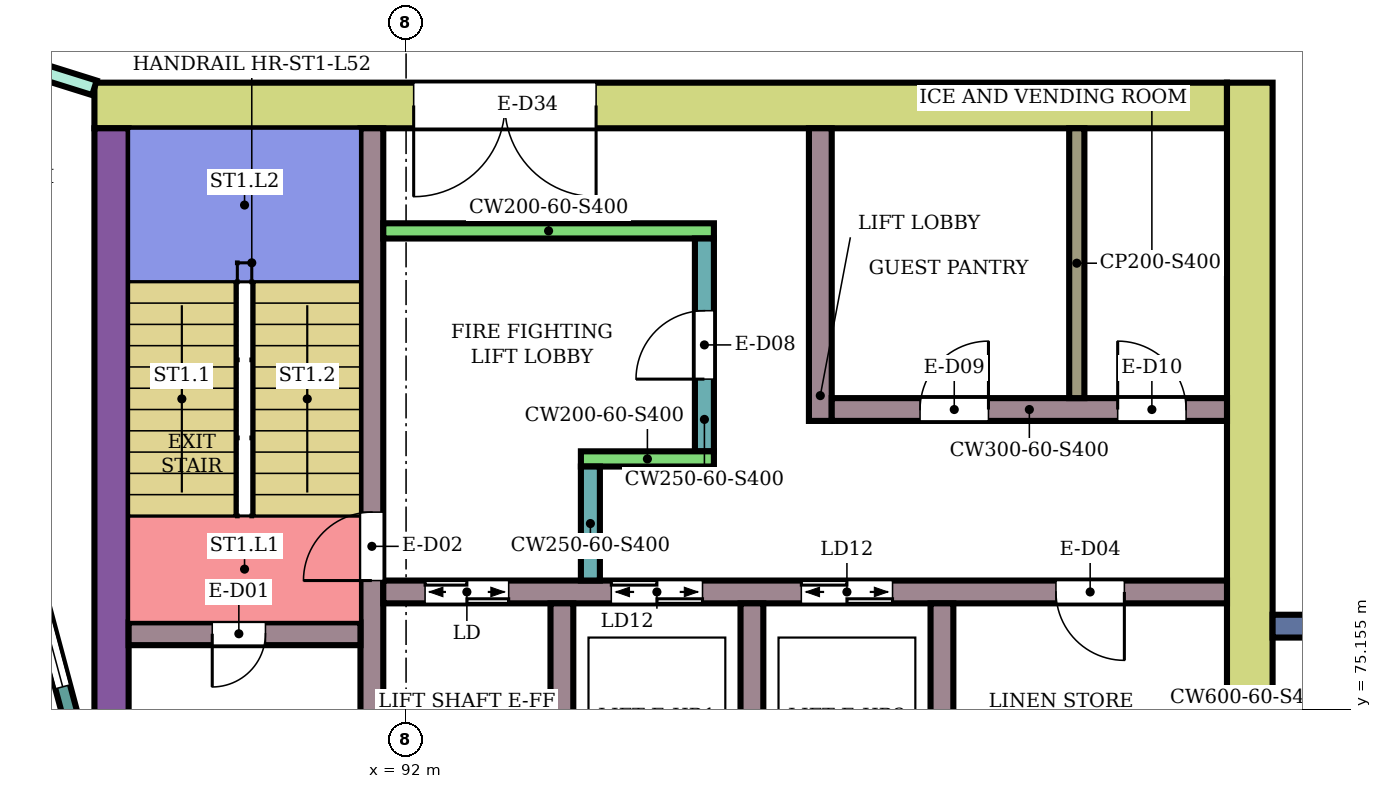
"""IFC4 building model, lengths in metres.
Left out: names, types, materials, properties, quantities, classifications, styles, units other than length and angle.
Written with IfcOpenShell. Run it as: python <this file> out.ifc"""

import sys

from ifc_helpers import new_model, si_unit, direction, frame, frame_2d, origin, place, context, subcontext, project, spatial, rectangle, extrude, element, fill, save


model = new_model("IFC4")
c1 = context("Model", 3, precision=1e-05, world=origin(), true_north=direction((0.0, 1.0)))
c2 = subcontext(c1, "Body", "Model", "MODEL_VIEW")
j1 = project(units=[si_unit("LENGTHUNIT", "METRE"), si_unit("PLANEANGLEUNIT", "RADIAN")], contexts=[c1])
p1 = place(None, origin())
s1 = spatial("IfcSite", under=j1, at=p1, CompositionType="ELEMENT")
p2 = place(p1, origin())
s2 = spatial("IfcBuilding", under=s1, at=p2, CompositionType="ELEMENT")
p3 = place(p2, frame((0.0, 0.0, 225.1)))
s3 = spatial("IfcBuildingStorey", under=s2, at=p3, CompositionType="ELEMENT", Elevation=225.1)
p4 = place(p3, frame((87.9, 83.1, 0.0), z_axis=(0.0, 0.0, 1.0), x_axis=(1.0, 0.0, 0.0)))
e1 = element("IfcWall", 1, at=p4, inside=s3, PredefinedType="SHEAR", context=c2, shape_type="SweptSolid", body=[
    extrude(rectangle(XDim=14.9, YDim=0.6, at=frame_2d((7.45, 0.0))), origin(), (0.0, 0.0, 1.0), 3.8),
])
p5 = place(p4, frame((4.2, 0.0, 0.0)))
e2 = element("IfcOpeningElement", 2, at=p5, cuts=e1, PredefinedType="OPENING", context=c2, shape_type="SweptSolid", body=[
    extrude(rectangle(XDim=2.4, YDim=2.4, at=frame_2d((1.2, 1.2))), frame((0.0, 0.31, 0.0), z_axis=(0.0, -1.0, 0.0), x_axis=(1.0, 0.0, 0.0)), (0.0, 0.0, 1.0), 0.62),
])
p6 = place(p3, frame((88.125, 75.0, 0.0), z_axis=(0.0, 0.0, 1.0), x_axis=(0.0, 1.0, 0.0)))
e3 = element("IfcWall", 3, at=p6, inside=s3, PredefinedType="SHEAR", context=c2, shape_type="SweptSolid", body=[
    extrude(rectangle(XDim=7.8, YDim=0.45, at=frame_2d((3.9, 0.0))), origin(), (0.0, 0.0, 1.0), 3.8),
])
p7 = place(p3, frame((103.1, 66.6, 0.0), z_axis=(0.0, 0.0, 1.0), x_axis=(0.0, 1.0, 0.0)))
e4 = element("IfcWall", 4, at=p7, inside=s3, PredefinedType="SHEAR", context=c2, shape_type="SweptSolid", body=[
    extrude(rectangle(XDim=16.8, YDim=0.6, at=frame_2d((8.4, 0.0))), origin(), (0.0, 0.0, 1.0), 3.8),
])
p8 = place(p3, frame((91.55, 75.0, 0.0), z_axis=(0.0, 0.0, 1.0), x_axis=(0.0, 1.0, 0.0)))
e5 = element("IfcWall", 5, at=p8, inside=s3, PredefinedType="SHEAR", context=c2, shape_type="SweptSolid", body=[
    extrude(rectangle(XDim=7.8, YDim=0.3, at=frame_2d((3.9, 0.0))), origin(), (0.0, 0.0, 1.0), 3.8),
])
p9 = place(p8, frame((1.85, 0.0, 0.0)))
e6 = element("IfcOpeningElement", 6, at=p9, cuts=e5, PredefinedType="OPENING", context=c2, shape_type="SweptSolid", body=[
    extrude(rectangle(XDim=0.9, YDim=2.1, at=frame_2d((0.45, 1.05))), frame((0.0, 0.16, 0.0), z_axis=(0.0, -1.0, 0.0), x_axis=(1.0, 0.0, 0.0)), (0.0, 0.0, 1.0), 0.32),
])
p10 = place(p3, frame((88.35, 76.15, 0.0), z_axis=(0.0, 0.0, 1.0), x_axis=(1.0, 0.0, 0.0)))
e7 = element("IfcWall", 7, at=p10, inside=s3, PredefinedType="SHEAR", context=c2, shape_type="SweptSolid", body=[
    extrude(rectangle(XDim=3.05, YDim=0.3, at=frame_2d((1.525, 0.0))), origin(), (0.0, 0.0, 1.0), 3.8),
])
p11 = place(p10, frame((1.1, 0.0, 0.0)))
e8 = element("IfcOpeningElement", 8, at=p11, cuts=e7, PredefinedType="OPENING", context=c2, shape_type="SweptSolid", body=[
    extrude(rectangle(XDim=0.7, YDim=2.0, at=frame_2d((0.35, 1.0))), frame((0.0, 0.16, 0.0), z_axis=(0.0, -1.0, 0.0), x_axis=(1.0, 0.0, 0.0)), (0.0, 0.0, 1.0), 0.32),
])
p12 = place(p3, frame((91.7, 76.7, 0.0), z_axis=(0.0, 0.0, 1.0), x_axis=(1.0, 0.0, 0.0)))
e9 = element("IfcWall", 9, at=p12, inside=s3, PredefinedType="SHEAR", context=c2, shape_type="SweptSolid", body=[
    extrude(rectangle(XDim=11.1, YDim=0.3, at=frame_2d((5.55, 0.0))), origin(), (0.0, 0.0, 1.0), 3.8),
])
p13 = place(p12, frame((0.55, 0.0, 0.0)))
e10 = element("IfcOpeningElement", 10, at=p13, cuts=e9, PredefinedType="OPENING", context=c2, shape_type="SweptSolid", body=[
    extrude(rectangle(XDim=1.1, YDim=2.1, at=frame_2d((0.55, 1.05))), frame((0.0, 0.16, 0.0), z_axis=(0.0, -1.0, 0.0), x_axis=(1.0, 0.0, 0.0)), (0.0, 0.0, 1.0), 0.32),
])
p14 = place(p12, frame((3.0, 0.0, 0.0)))
e11 = element("IfcOpeningElement", 11, at=p14, cuts=e9, PredefinedType="OPENING", context=c2, shape_type="SweptSolid", body=[
    extrude(rectangle(XDim=1.2, YDim=2.1, at=frame_2d((0.6, 1.05))), frame((0.0, 0.16, 0.0), z_axis=(0.0, -1.0, 0.0), x_axis=(1.0, 0.0, 0.0)), (0.0, 0.0, 1.0), 0.32),
])
p15 = place(p12, frame((5.5, 0.0, 0.0)))
e12 = element("IfcOpeningElement", 12, at=p15, cuts=e9, PredefinedType="OPENING", context=c2, shape_type="SweptSolid", body=[
    extrude(rectangle(XDim=1.2, YDim=2.1, at=frame_2d((0.6, 1.05))), frame((0.0, 0.16, 0.0), z_axis=(0.0, -1.0, 0.0), x_axis=(1.0, 0.0, 0.0)), (0.0, 0.0, 1.0), 0.32),
])
p16 = place(p12, frame((8.85, 0.0, 0.0)))
e13 = element("IfcOpeningElement", 13, at=p16, cuts=e9, PredefinedType="OPENING", context=c2, shape_type="SweptSolid", body=[
    extrude(rectangle(XDim=0.9, YDim=2.1, at=frame_2d((0.45, 1.05))), frame((0.0, 0.16, 0.0), z_axis=(0.0, -1.0, 0.0), x_axis=(1.0, 0.0, 0.0)), (0.0, 0.0, 1.0), 0.32),
])
for number, where, z_axis, x_axis in (
    (14, (94.05, 74.0, 0.0), (0.0, 0.0, 1.0), (0.0, 1.0, 0.0)),
    (15, (96.55, 74.0, 0.0), (0.0, 0.0, 1.0), (0.0, 1.0, 0.0)),
    (16, (99.05, 74.0, 0.0), (0.0, 0.0, 1.0), (0.0, 1.0, 0.0)),
):
    element("IfcWall", number, at=place(p3, frame(where, z_axis=z_axis, x_axis=x_axis)), inside=s3, PredefinedType="SHEAR", context=c2, shape_type="SweptSolid", body=[
        extrude(rectangle(XDim=2.55, YDim=0.3, at=frame_2d((1.275, 0.0))), origin(), (0.0, 0.0, 1.0), 3.8),
    ])
p17 = place(p3, frame((91.7, 81.45, 0.0), z_axis=(0.0, 0.0, 1.0), x_axis=(1.0, 0.0, 0.0)))
e17 = element("IfcWall", 17, at=p17, inside=s3, PredefinedType="SHEAR", context=c2, shape_type="SweptSolid", body=[
    extrude(rectangle(XDim=4.35, YDim=0.2, at=frame_2d((2.175, 0.0))), origin(), (0.0, 0.0, 1.0), 3.8),
])
p18 = place(p3, frame((95.925, 78.55, 0.0), z_axis=(0.0, 0.0, 1.0), x_axis=(0.0, 1.0, 0.0)))
e18 = element("IfcWall", 18, at=p18, inside=s3, PredefinedType="SHEAR", context=c2, shape_type="SweptSolid", body=[
    extrude(rectangle(XDim=2.8, YDim=0.25, at=frame_2d((1.4, 0.0))), origin(), (0.0, 0.0, 1.0), 3.8),
])
p19 = place(p18, frame((0.95, 0.0, 0.0)))
e19 = element("IfcOpeningElement", 19, at=p19, cuts=e18, PredefinedType="OPENING", context=c2, shape_type="SweptSolid", body=[
    extrude(rectangle(XDim=0.9, YDim=2.1, at=frame_2d((0.45, 1.05))), frame((0.0, 0.135, 0.0), z_axis=(0.0, -1.0, 0.0), x_axis=(1.0, 0.0, 0.0)), (0.0, 0.0, 1.0), 0.27),
])
p20 = place(p3, frame((94.3, 78.45, 0.0), z_axis=(0.0, 0.0, 1.0), x_axis=(1.0, 0.0, 0.0)))
e20 = element("IfcWall", 20, at=p20, inside=s3, PredefinedType="SHEAR", context=c2, shape_type="SweptSolid", body=[
    extrude(rectangle(XDim=1.75, YDim=0.2, at=frame_2d((0.875, 0.0))), origin(), (0.0, 0.0, 1.0), 3.8),
])
p21 = place(p3, frame((94.425, 76.85, 0.0), z_axis=(0.0, 0.0, 1.0), x_axis=(0.0, 1.0, 0.0)))
e21 = element("IfcWall", 21, at=p21, inside=s3, PredefinedType="SHEAR", context=c2, shape_type="SweptSolid", body=[
    extrude(rectangle(XDim=1.5, YDim=0.25, at=frame_2d((0.75, 0.0))), origin(), (0.0, 0.0, 1.0), 3.8),
])
p22 = place(p3, frame((97.45, 78.95, 0.0), z_axis=(0.0, 0.0, 1.0), x_axis=(0.0, 1.0, 0.0)))
e22 = element("IfcWall", 22, at=p22, inside=s3, PredefinedType="SHEAR", context=c2, shape_type="SweptSolid", body=[
    extrude(rectangle(XDim=3.85, YDim=0.3, at=frame_2d((1.925, 0.0))), origin(), (0.0, 0.0, 1.0), 3.8),
])
p23 = place(p3, frame((97.6, 79.1, 0.0), z_axis=(0.0, 0.0, 1.0), x_axis=(1.0, 0.0, 0.0)))
e23 = element("IfcWall", 23, at=p23, inside=s3, PredefinedType="SHEAR", context=c2, shape_type="SweptSolid", body=[
    extrude(rectangle(XDim=5.2, YDim=0.3, at=frame_2d((2.6, 0.0))), origin(), (0.0, 0.0, 1.0), 3.8),
])
p24 = place(p23, frame((1.162, 0.0, 0.0)))
e24 = element("IfcOpeningElement", 24, at=p24, cuts=e23, PredefinedType="OPENING", context=c2, shape_type="SweptSolid", body=[
    extrude(rectangle(XDim=0.9, YDim=2.1, at=frame_2d((0.45, 1.05))), frame((0.0, 0.16, 0.0), z_axis=(0.0, -1.0, 0.0), x_axis=(1.0, 0.0, 0.0)), (0.0, 0.0, 1.0), 0.32),
])
p25 = place(p23, frame((3.762, 0.0, 0.0)))
e25 = element("IfcOpeningElement", 25, at=p25, cuts=e23, PredefinedType="OPENING", context=c2, shape_type="SweptSolid", body=[
    extrude(rectangle(XDim=0.9, YDim=2.1, at=frame_2d((0.45, 1.05))), frame((0.0, 0.16, 0.0), z_axis=(0.0, -1.0, 0.0), x_axis=(1.0, 0.0, 0.0)), (0.0, 0.0, 1.0), 0.32),
])
p26 = place(p3, frame((103.4, 76.25, 0.0), z_axis=(0.0, 0.0, 1.0), x_axis=(1.0, 0.0, 0.0)))
e26 = element("IfcWall", 26, at=p26, inside=s3, PredefinedType="NOTDEFINED", context=c2, shape_type="SweptSolid", body=[
    extrude(rectangle(XDim=2.416, YDim=0.3, at=frame_2d((1.208, 0.0))), origin(), (0.0, 0.0, 1.0), 4.2),
])
p27 = place(p3, frame((87.604, 75.0, 0.0), z_axis=(0.0, 0.0, 1.0), x_axis=(-0.258789828301, 0.965933654434, 0.0)))
e27 = element("IfcWall", 27, at=p27, inside=s3, PredefinedType="NOTDEFINED", context=c2, shape_type="SweptSolid", body=[
    extrude(rectangle(XDim=3.936, YDim=0.2, at=frame_2d((1.968, 0.0))), origin(), (0.0, 0.0, 1.0), 4.2),
])
p28 = place(p27, frame((0.468, 0.0, 0.9)))
e28 = element("IfcOpeningElement", 28, at=p28, cuts=e27, PredefinedType="OPENING", context=c2, shape_type="SweptSolid", body=[
    extrude(rectangle(XDim=3.0, YDim=2.3, at=frame_2d((1.5, 1.15))), frame((0.0, 0.11, 0.0), z_axis=(0.0, -1.0, 0.0), x_axis=(1.0, 0.0, 0.0)), (0.0, 0.0, 1.0), 0.22),
])
p29 = place(p3, frame((85.587, 84.057, 0.0), z_axis=(0.0, 0.0, 1.0), x_axis=(0.954239513179, -0.299043393987, 0.0)))
e29 = element("IfcWall", 29, at=p29, inside=s3, PredefinedType="PARTITIONING", context=c2, shape_type="SweptSolid", body=[
    extrude(rectangle(XDim=2.424, YDim=0.2, at=frame_2d((1.212, 0.0))), origin(), (0.0, 0.0, 1.0), 3.75),
])
p30 = place(p29, frame((0.762, 0.0, 0.0)))
e30 = element("IfcOpeningElement", 30, at=p30, cuts=e29, PredefinedType="OPENING", context=c2, shape_type="SweptSolid", body=[
    extrude(rectangle(XDim=0.9, YDim=2.1, at=frame_2d((0.45, 1.05))), frame((0.0, 0.11, 0.0), z_axis=(0.0, -1.0, 0.0), x_axis=(1.0, 0.0, 0.0)), (0.0, 0.0, 1.0), 0.22),
])
p31 = place(p3, frame((100.824, 79.25, 0.0), z_axis=(0.0, 0.0, 1.0), x_axis=(0.0, 1.0, 0.0)))
e31 = element("IfcWall", 31, at=p31, inside=s3, PredefinedType="PARTITIONING", context=c2, shape_type="SweptSolid", body=[
    extrude(rectangle(XDim=3.55, YDim=0.2, at=frame_2d((1.775, 0.0))), origin(), (0.0, 0.0, 1.0), 3.8),
])
p32 = place(p28, origin())
e32 = element("IfcWindow", 32, at=p32, inside=s3, PartitioningType="SINGLE_PANEL", PredefinedType="WINDOW", context=c2, shape_type="SweptSolid", body=[
    extrude(rectangle(XDim=3.0, YDim=2.3, at=frame_2d((1.5, 1.15))), frame((0.0, 0.03, 0.0), z_axis=(0.0, -1.0, 0.0), x_axis=(1.0, 0.0, 0.0)), (0.0, 0.0, 1.0), 0.06),
])
fill(e28, e32)
p33 = place(p11, frame((0.7, 0.0, 0.0), z_axis=(0.0, 0.0, 1.0), x_axis=(-1.0, 0.0, 0.0)))
e33 = element("IfcDoor", 33, at=p33, inside=s3, OperationType="SINGLE_SWING_RIGHT", PredefinedType="DOOR", context=c2, shape_type="SweptSolid", body=[
    extrude(rectangle(XDim=0.7, YDim=2.0, at=frame_2d((0.35, 1.0))), frame((0.0, 0.025, 0.0), z_axis=(0.0, -1.0, 0.0), x_axis=(1.0, 0.0, 0.0)), (0.0, 0.0, 1.0), 0.05),
])
fill(e8, e33)
p34 = place(p9, origin())
e34 = element("IfcDoor", 34, at=p34, inside=s3, OperationType="SINGLE_SWING_LEFT", PredefinedType="DOOR", context=c2, shape_type="SweptSolid", body=[
    extrude(rectangle(XDim=0.9, YDim=2.1, at=frame_2d((0.45, 1.05))), frame((0.0, 0.025, 0.0), z_axis=(0.0, -1.0, 0.0), x_axis=(1.0, 0.0, 0.0)), (0.0, 0.0, 1.0), 0.05),
])
fill(e6, e34)
p35 = place(p13, origin())
e35 = element("IfcDoor", 35, at=p35, inside=s3, OperationType="DOUBLE_DOOR_SLIDING", PredefinedType="DOOR", context=c2, shape_type="SweptSolid", body=[
    extrude(rectangle(XDim=1.1, YDim=2.1, at=frame_2d((0.55, 1.05))), frame((0.0, 0.025, 0.0), z_axis=(0.0, -1.0, 0.0), x_axis=(1.0, 0.0, 0.0)), (0.0, 0.0, 1.0), 0.05),
])
fill(e10, e35)
p36 = place(p14, origin())
e36 = element("IfcDoor", 36, at=p36, inside=s3, OperationType="DOUBLE_DOOR_SLIDING", PredefinedType="DOOR", context=c2, shape_type="SweptSolid", body=[
    extrude(rectangle(XDim=1.2, YDim=2.1, at=frame_2d((0.6, 1.05))), frame((0.0, 0.025, 0.0), z_axis=(0.0, -1.0, 0.0), x_axis=(1.0, 0.0, 0.0)), (0.0, 0.0, 1.0), 0.05),
])
fill(e11, e36)
p37 = place(p15, origin())
e37 = element("IfcDoor", 37, at=p37, inside=s3, OperationType="DOUBLE_DOOR_SLIDING", PredefinedType="DOOR", context=c2, shape_type="SweptSolid", body=[
    extrude(rectangle(XDim=1.2, YDim=2.1, at=frame_2d((0.6, 1.05))), frame((0.0, 0.025, 0.0), z_axis=(0.0, -1.0, 0.0), x_axis=(1.0, 0.0, 0.0)), (0.0, 0.0, 1.0), 0.05),
])
fill(e12, e37)
p38 = place(p16, frame((0.9, 0.0, 0.0), z_axis=(0.0, 0.0, 1.0), x_axis=(-1.0, 0.0, 0.0)))
e38 = element("IfcDoor", 38, at=p38, inside=s3, OperationType="SINGLE_SWING_LEFT", PredefinedType="DOOR", context=c2, shape_type="SweptSolid", body=[
    extrude(rectangle(XDim=0.9, YDim=2.1, at=frame_2d((0.45, 1.05))), frame((0.0, 0.025, 0.0), z_axis=(0.0, -1.0, 0.0), x_axis=(1.0, 0.0, 0.0)), (0.0, 0.0, 1.0), 0.05),
])
fill(e13, e38)
p39 = place(p19, origin())
e39 = element("IfcDoor", 39, at=p39, inside=s3, OperationType="SINGLE_SWING_LEFT", PredefinedType="DOOR", context=c2, shape_type="SweptSolid", body=[
    extrude(rectangle(XDim=0.9, YDim=2.1, at=frame_2d((0.45, 1.05))), frame((0.0, 0.025, 0.0), z_axis=(0.0, -1.0, 0.0), x_axis=(1.0, 0.0, 0.0)), (0.0, 0.0, 1.0), 0.05),
])
fill(e19, e39)
p40 = place(p24, origin())
e40 = element("IfcDoor", 40, at=p40, inside=s3, OperationType="SINGLE_SWING_RIGHT", PredefinedType="DOOR", context=c2, shape_type="SweptSolid", body=[
    extrude(rectangle(XDim=0.9, YDim=2.1, at=frame_2d((0.45, 1.05))), frame((0.0, 0.025, 0.0), z_axis=(0.0, -1.0, 0.0), x_axis=(1.0, 0.0, 0.0)), (0.0, 0.0, 1.0), 0.05),
])
fill(e24, e40)
p41 = place(p25, origin())
e41 = element("IfcDoor", 41, at=p41, inside=s3, OperationType="SINGLE_SWING_LEFT", PredefinedType="DOOR", context=c2, shape_type="SweptSolid", body=[
    extrude(rectangle(XDim=0.9, YDim=2.1, at=frame_2d((0.45, 1.05))), frame((0.0, 0.025, 0.0), z_axis=(0.0, -1.0, 0.0), x_axis=(1.0, 0.0, 0.0)), (0.0, 0.0, 1.0), 0.05),
])
fill(e25, e41)
p42 = place(p5, frame((2.4, 0.0, 0.0), z_axis=(0.0, 0.0, 1.0), x_axis=(-1.0, 0.0, 0.0)))
e42 = element("IfcDoor", 42, at=p42, inside=s3, OperationType="DOUBLE_DOOR_SINGLE_SWING", PredefinedType="DOOR", context=c2, shape_type="SweptSolid", body=[
    extrude(rectangle(XDim=2.4, YDim=2.4, at=frame_2d((1.2, 1.2))), frame((0.0, 0.025, 0.0), z_axis=(0.0, -1.0, 0.0), x_axis=(1.0, 0.0, 0.0)), (0.0, 0.0, 1.0), 0.05),
])
fill(e2, e42)
save(model, sys.argv[1])
